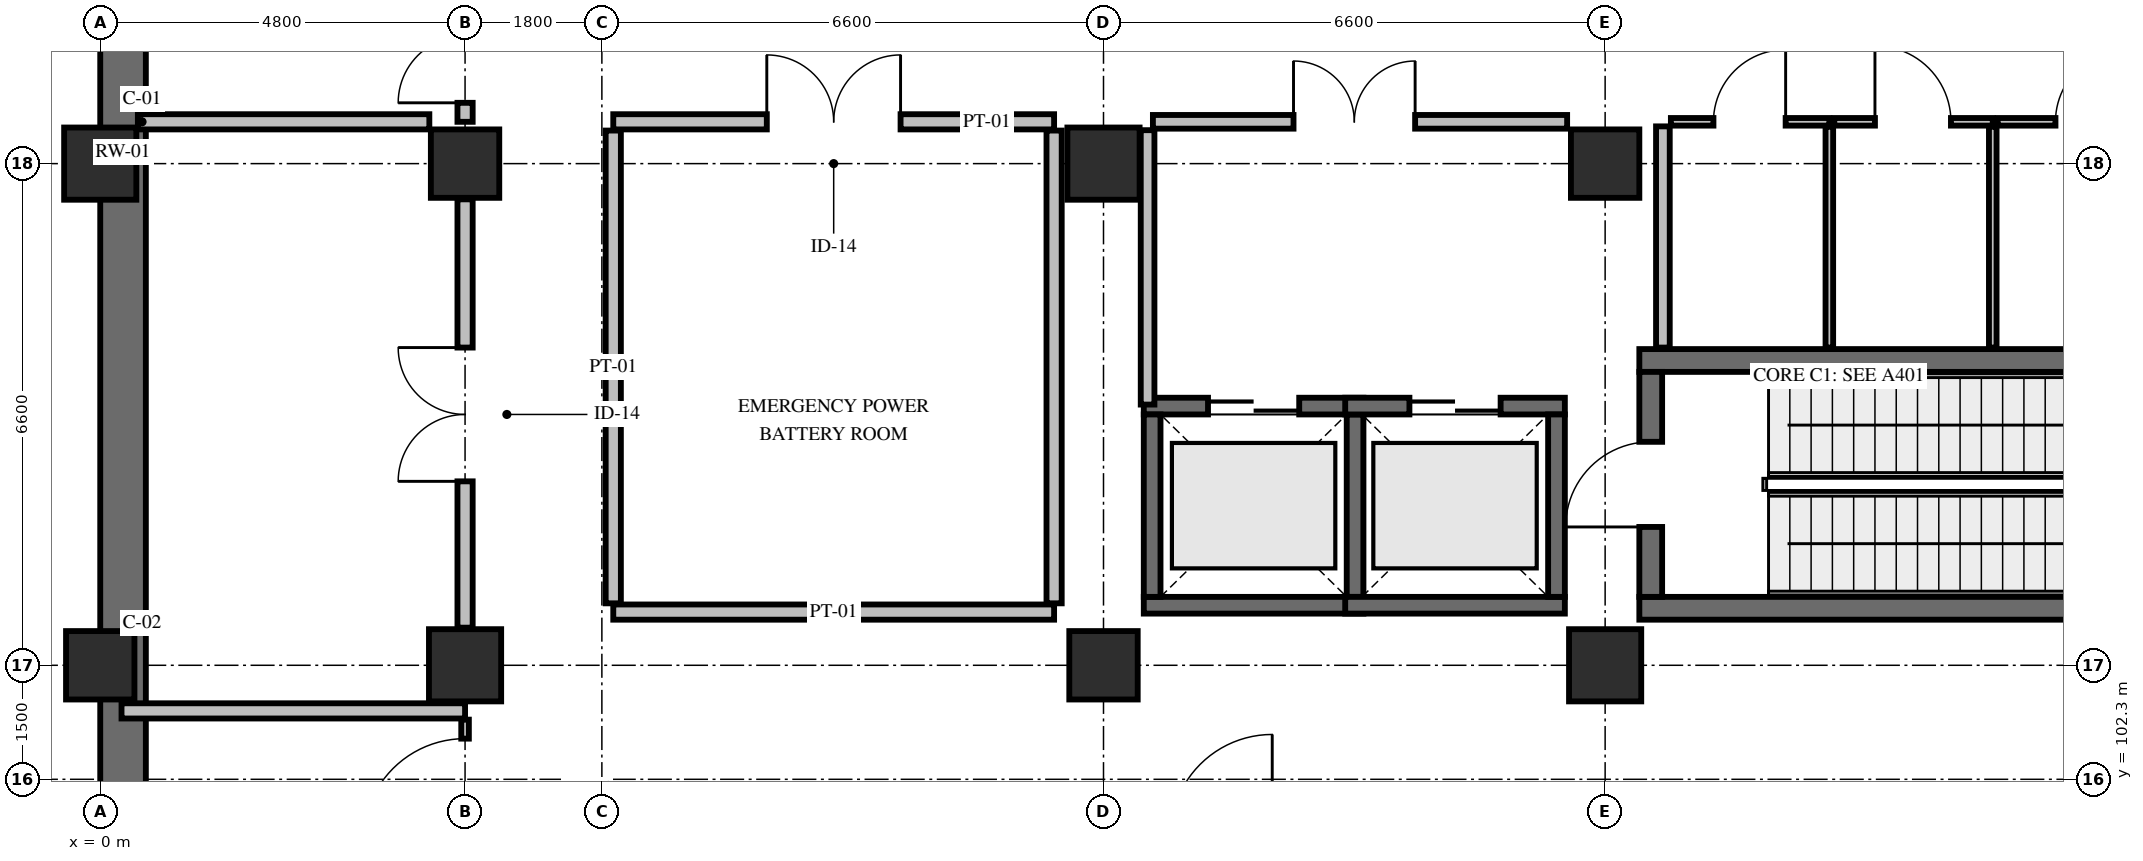
"""IFC4 building model, lengths in metres.
Left out: names, types, materials, properties, quantities, classifications, styles, units other than length and angle.
Written with IfcOpenShell. Run it as: python <this file> out.ifc"""

import sys

from ifc_helpers import new_model, si_unit, direction, frame, frame_2d, origin, origin_2d, place, context, subcontext, project, spatial, rectangle, extrude, element, fill, save


model = new_model("IFC4")
c1 = context("Model", 3, precision=1e-05, world=origin(), true_north=direction((0.0, 1.0)))
c2 = subcontext(c1, "Body", "Model", "MODEL_VIEW")
j1 = project(units=[si_unit("LENGTHUNIT", "METRE"), si_unit("PLANEANGLEUNIT", "RADIAN")], contexts=[c1])
p1 = place(None, origin())
s1 = spatial("IfcSite", under=j1, at=p1, CompositionType="ELEMENT")
p2 = place(p1, origin())
s2 = spatial("IfcBuilding", under=s1, at=p2, CompositionType="ELEMENT")
p3 = place(p2, frame((0.0, 0.0, -5.4)))
s3 = spatial("IfcBuildingStorey", under=s2, at=p3, CompositionType="ELEMENT", Elevation=-5.4)
p4 = place(p3, frame((0.3, 99.6, 0.0), z_axis=(0.0, 0.0, 1.0), x_axis=(0.0, 1.0, 0.0)))
e1 = element("IfcWall", 1, at=p4, inside=s3, PredefinedType="USERDEFINED", context=c2, shape_type="SweptSolid", body=[
    extrude(rectangle(XDim=21.9, YDim=0.6, at=frame_2d((10.95, 0.0))), origin(), (0.0, 0.0, 1.0), 4.96),
])
p5 = place(p3, frame((0.0, 103.8, 0.0), z_axis=(0.0, 0.0, 1.0), x_axis=(1.0, 0.0, 0.0)))
e2 = element("IfcColumn", 2, at=p5, inside=s3, PredefinedType="COLUMN", context=c2, shape_type="SweptSolid", body=[
    extrude(rectangle(XDim=0.9, YDim=0.9, at=origin_2d()), origin(), (0.0, 0.0, 1.0), 5.4),
])
for number, where, z_axis, x_axis in (
    (3, (0.0, 110.4, 0.0), (0.0, 0.0, 1.0), (1.0, 0.0, 0.0)),
    (4, (4.8, 103.8, 0.0), (0.0, 0.0, 1.0), (1.0, 0.0, 0.0)),
):
    element("IfcColumn", number, at=place(p3, frame(where, z_axis=z_axis, x_axis=x_axis)), inside=s3, PredefinedType="COLUMN", context=c2, shape_type="SweptSolid", body=[
        extrude(rectangle(XDim=0.95, YDim=0.95, at=origin_2d()), origin(), (0.0, 0.0, 1.0), 5.4),
    ])
for number, where, z_axis, x_axis in (
    (5, (4.8, 110.4, 0.0), (0.0, 0.0, 1.0), (1.0, 0.0, 0.0)),
    (6, (13.2, 103.8, 0.0), (0.0, 0.0, 1.0), (1.0, 0.0, 0.0)),
):
    element("IfcColumn", number, at=place(p3, frame(where, z_axis=z_axis, x_axis=x_axis)), inside=s3, PredefinedType="COLUMN", context=c2, shape_type="SweptSolid", body=[
        extrude(rectangle(XDim=0.9, YDim=0.9, at=origin_2d()), origin(), (0.0, 0.0, 1.0), 5.4),
    ])
for number, where, z_axis, x_axis in (
    (7, (13.2, 110.4, 0.0), (0.0, 0.0, 1.0), (1.0, 0.0, 0.0)),
    (8, (19.8, 103.8, 0.0), (0.0, 0.0, 1.0), (1.0, 0.0, 0.0)),
):
    element("IfcColumn", number, at=place(p3, frame(where, z_axis=z_axis, x_axis=x_axis)), inside=s3, PredefinedType="COLUMN", context=c2, shape_type="SweptSolid", body=[
        extrude(rectangle(XDim=0.95, YDim=0.95, at=origin_2d()), origin(), (0.0, 0.0, 1.0), 5.4),
    ])
p6 = place(p3, frame((19.8, 110.4, 0.0), z_axis=(0.0, 0.0, 1.0), x_axis=(1.0, 0.0, 0.0)))
e9 = element("IfcColumn", 9, at=p6, inside=s3, PredefinedType="COLUMN", context=c2, shape_type="SweptSolid", body=[
    extrude(rectangle(XDim=0.9, YDim=0.9, at=origin_2d()), origin(), (0.0, 0.0, 1.0), 5.4),
])
for number, where, z_axis, x_axis in (
    (10, (20.25, 104.55, 0.0), (0.0, 0.0, 1.0), (1.0, 0.0, 0.0)),
    (11, (20.25, 107.81, 0.0), (0.0, 0.0, 1.0), (1.0, 0.0, 0.0)),
):
    element("IfcWall", number, at=place(p3, frame(where, z_axis=z_axis, x_axis=x_axis)), inside=s3, PredefinedType="SHEAR", context=c2, shape_type="SweptSolid", body=[
        extrude(rectangle(XDim=7.6, YDim=0.3, at=frame_2d((3.8, 0.0))), origin(), (0.0, 0.0, 1.0), 4.98),
    ])
p7 = place(p3, frame((20.4, 104.7, 0.0), z_axis=(0.0, 0.0, 1.0), x_axis=(0.0, 1.0, 0.0)))
e12 = element("IfcWall", 12, at=p7, inside=s3, PredefinedType="SHEAR", context=c2, shape_type="SweptSolid", body=[
    extrude(rectangle(XDim=2.96, YDim=0.3, at=frame_2d((1.48, 0.0))), origin(), (0.0, 0.0, 1.0), 4.98),
])
p8 = place(p7, frame((0.92, 0.0, 0.0)))
e13 = element("IfcOpeningElement", 13, at=p8, cuts=e12, PredefinedType="OPENING", context=c2, shape_type="SweptSolid", body=[
    extrude(rectangle(XDim=1.12, YDim=2.2, at=frame_2d((0.56, 1.1))), frame((0.0, 0.165, 0.0), z_axis=(0.0, -1.0, 0.0), x_axis=(1.0, 0.0, 0.0)), (0.0, 0.0, 1.0), 0.33),
])
p9 = place(p3, frame((13.73, 104.59, 0.0), z_axis=(0.0, 0.0, 1.0), x_axis=(1.0, 0.0, 0.0)))
e14 = element("IfcWall", 14, at=p9, inside=s3, PredefinedType="SHEAR", context=c2, shape_type="SweptSolid", body=[
    extrude(rectangle(XDim=2.89, YDim=0.22, at=frame_2d((1.445, 0.0))), origin(), (0.0, 0.0, 1.0), 4.98),
])
p10 = place(p3, frame((13.73, 107.21, 0.0), z_axis=(0.0, 0.0, 1.0), x_axis=(1.0, 0.0, 0.0)))
e15 = element("IfcWall", 15, at=p10, inside=s3, PredefinedType="SHEAR", context=c2, shape_type="SweptSolid", body=[
    extrude(rectangle(XDim=2.89, YDim=0.22, at=frame_2d((1.445, 0.0))), origin(), (0.0, 0.0, 1.0), 4.98),
])
p11 = place(p10, frame((0.845, 0.0, 0.0)))
e16 = element("IfcOpeningElement", 16, at=p11, cuts=e15, PredefinedType="OPENING", context=c2, shape_type="SweptSolid", body=[
    extrude(rectangle(XDim=1.2, YDim=2.2, at=frame_2d((0.6, 1.1))), frame((0.0, 0.125, 0.0), z_axis=(0.0, -1.0, 0.0), x_axis=(1.0, 0.0, 0.0)), (0.0, 0.0, 1.0), 0.25),
])
for number, where, z_axis, x_axis in (
    (17, (13.84, 104.7, 0.0), (0.0, 0.0, 1.0), (0.0, 1.0, 0.0)),
    (18, (16.51, 104.7, 0.0), (0.0, 0.0, 1.0), (0.0, 1.0, 0.0)),
):
    element("IfcWall", number, at=place(p3, frame(where, z_axis=z_axis, x_axis=x_axis)), inside=s3, PredefinedType="SHEAR", context=c2, shape_type="SweptSolid", body=[
        extrude(rectangle(XDim=2.4, YDim=0.22, at=frame_2d((1.2, 0.0))), origin(), (0.0, 0.0, 1.0), 4.98),
    ])
p12 = place(p3, frame((16.38, 104.59, 0.0), z_axis=(0.0, 0.0, 1.0), x_axis=(1.0, 0.0, 0.0)))
e19 = element("IfcWall", 19, at=p12, inside=s3, PredefinedType="SHEAR", context=c2, shape_type="SweptSolid", body=[
    extrude(rectangle(XDim=2.89, YDim=0.22, at=frame_2d((1.445, 0.0))), origin(), (0.0, 0.0, 1.0), 4.98),
])
p13 = place(p3, frame((16.38, 107.21, 0.0), z_axis=(0.0, 0.0, 1.0), x_axis=(1.0, 0.0, 0.0)))
e20 = element("IfcWall", 20, at=p13, inside=s3, PredefinedType="SHEAR", context=c2, shape_type="SweptSolid", body=[
    extrude(rectangle(XDim=2.89, YDim=0.22, at=frame_2d((1.445, 0.0))), origin(), (0.0, 0.0, 1.0), 4.98),
])
p14 = place(p13, frame((0.845, 0.0, 0.0)))
e21 = element("IfcOpeningElement", 21, at=p14, cuts=e20, PredefinedType="OPENING", context=c2, shape_type="SweptSolid", body=[
    extrude(rectangle(XDim=1.2, YDim=2.2, at=frame_2d((0.6, 1.1))), frame((0.0, 0.125, 0.0), z_axis=(0.0, -1.0, 0.0), x_axis=(1.0, 0.0, 0.0)), (0.0, 0.0, 1.0), 0.25),
])
p15 = place(p3, frame((19.16, 104.7, 0.0), z_axis=(0.0, 0.0, 1.0), x_axis=(0.0, 1.0, 0.0)))
e22 = element("IfcWall", 22, at=p15, inside=s3, PredefinedType="SHEAR", context=c2, shape_type="SweptSolid", body=[
    extrude(rectangle(XDim=2.4, YDim=0.22, at=frame_2d((1.2, 0.0))), origin(), (0.0, 0.0, 1.0), 4.98),
])
p16 = place(p3, frame((13.85, 110.95, 0.0), z_axis=(0.0, 0.0, 1.0), x_axis=(1.0, 0.0, 0.0)))
e23 = element("IfcWall", 23, at=p16, inside=s3, PredefinedType="PARTITIONING", context=c2, shape_type="SweptSolid", body=[
    extrude(rectangle(XDim=5.45, YDim=0.18, at=frame_2d((2.725, 0.0))), origin(), (0.0, 0.0, 1.0), 4.895),
])
p17 = place(p16, frame((1.85, 0.0, 0.0)))
e24 = element("IfcOpeningElement", 24, at=p17, cuts=e23, PredefinedType="OPENING", context=c2, shape_type="SweptSolid", body=[
    extrude(rectangle(XDim=1.6, YDim=2.25, at=frame_2d((0.8, 1.125))), frame((0.0, 0.105, 0.0), z_axis=(0.0, -1.0, 0.0), x_axis=(1.0, 0.0, 0.0)), (0.0, 0.0, 1.0), 0.21),
])
p18 = place(p3, frame((13.78, 107.23, 0.0), z_axis=(0.0, 0.0, 1.0), x_axis=(0.0, 1.0, 0.0)))
e25 = element("IfcWall", 25, at=p18, inside=s3, PredefinedType="PARTITIONING", context=c2, shape_type="SweptSolid", body=[
    extrude(rectangle(XDim=3.61, YDim=0.18, at=frame_2d((1.805, 0.0))), origin(), (0.0, 0.0, 1.0), 4.73),
])
p19 = place(p3, frame((20.56, 107.98, 0.0), z_axis=(0.0, 0.0, 1.0), x_axis=(0.0, 1.0, 0.0)))
e26 = element("IfcWall", 26, at=p19, inside=s3, PredefinedType="PARTITIONING", context=c2, shape_type="SweptSolid", body=[
    extrude(rectangle(XDim=2.91, YDim=0.18, at=frame_2d((1.455, 0.0))), origin(), (0.0, 0.0, 1.0), 4.43),
])
p20 = place(p3, frame((20.665, 110.95, 0.0), z_axis=(0.0, 0.0, 1.0), x_axis=(1.0, 0.0, 0.0)))
e27 = element("IfcWall", 27, at=p20, inside=s3, PredefinedType="PARTITIONING", context=c2, shape_type="SweptSolid", body=[
    extrude(rectangle(XDim=2.085, YDim=0.1, at=frame_2d((1.042, 0.0))), origin(), (0.0, 0.0, 1.0), 4.895),
])
p21 = place(p20, frame((0.56, 0.0, 0.0)))
e28 = element("IfcOpeningElement", 28, at=p21, cuts=e27, PredefinedType="OPENING", context=c2, shape_type="SweptSolid", body=[
    extrude(rectangle(XDim=0.95, YDim=2.15, at=frame_2d((0.475, 1.075))), frame((0.0, 0.065, 0.0), z_axis=(0.0, -1.0, 0.0), x_axis=(1.0, 0.0, 0.0)), (0.0, 0.0, 1.0), 0.13),
])
p22 = place(p3, frame((22.75, 107.98, 0.0), z_axis=(0.0, 0.0, 1.0), x_axis=(0.0, 1.0, 0.0)))
e29 = element("IfcWall", 29, at=p22, inside=s3, PredefinedType="PARTITIONING", context=c2, shape_type="SweptSolid", body=[
    extrude(rectangle(XDim=2.905, YDim=0.1, at=frame_2d((1.453, 0.0))), origin(), (0.0, 0.0, 1.0), 4.43),
])
p23 = place(p3, frame((22.815, 110.95, 0.0), z_axis=(0.0, 0.0, 1.0), x_axis=(1.0, 0.0, 0.0)))
e30 = element("IfcWall", 30, at=p23, inside=s3, PredefinedType="PARTITIONING", context=c2, shape_type="SweptSolid", body=[
    extrude(rectangle(XDim=2.085, YDim=0.1, at=frame_2d((1.042, 0.0))), origin(), (0.0, 0.0, 1.0), 4.96),
])
p24 = place(p23, frame((0.535, 0.0, 0.0)))
e31 = element("IfcOpeningElement", 31, at=p24, cuts=e30, PredefinedType="OPENING", context=c2, shape_type="SweptSolid", body=[
    extrude(rectangle(XDim=1.0, YDim=2.15, at=frame_2d((0.5, 1.075))), frame((0.0, 0.065, 0.0), z_axis=(0.0, -1.0, 0.0), x_axis=(1.0, 0.0, 0.0)), (0.0, 0.0, 1.0), 0.13),
])
p25 = place(p3, frame((24.9, 107.98, 0.0), z_axis=(0.0, 0.0, 1.0), x_axis=(0.0, 1.0, 0.0)))
e32 = element("IfcWall", 32, at=p25, inside=s3, PredefinedType="PARTITIONING", context=c2, shape_type="SweptSolid", body=[
    extrude(rectangle(XDim=2.905, YDim=0.1, at=frame_2d((1.453, 0.0))), origin(), (0.0, 0.0, 1.0), 4.43),
])
p26 = place(p3, frame((24.965, 110.95, 0.0), z_axis=(0.0, 0.0, 1.0), x_axis=(1.0, 0.0, 0.0)))
e33 = element("IfcWall", 33, at=p26, inside=s3, PredefinedType="PARTITIONING", context=c2, shape_type="SweptSolid", body=[
    extrude(rectangle(XDim=2.485, YDim=0.1, at=frame_2d((1.242, 0.0))), origin(), (0.0, 0.0, 1.0), 4.895),
])
p27 = place(p26, frame((0.76, 0.0, 0.0)))
e34 = element("IfcOpeningElement", 34, at=p27, cuts=e33, PredefinedType="OPENING", context=c2, shape_type="SweptSolid", body=[
    extrude(rectangle(XDim=0.95, YDim=2.15, at=frame_2d((0.475, 1.075))), frame((0.0, 0.065, 0.0), z_axis=(0.0, -1.0, 0.0), x_axis=(1.0, 0.0, 0.0)), (0.0, 0.0, 1.0), 0.13),
])
p28 = place(p3, frame((6.75, 104.5, 0.0), z_axis=(0.0, 0.0, 1.0), x_axis=(1.0, 0.0, 0.0)))
e35 = element("IfcWall", 35, at=p28, inside=s3, PredefinedType="PARTITIONING", context=c2, shape_type="SweptSolid", body=[
    extrude(rectangle(XDim=5.8, YDim=0.2, at=frame_2d((2.9, 0.0))), origin(), (0.0, 0.0, 1.0), 4.895),
])
p29 = place(p3, frame((6.75, 110.95, 0.0), z_axis=(0.0, 0.0, 1.0), x_axis=(1.0, 0.0, 0.0)))
e36 = element("IfcWall", 36, at=p29, inside=s3, PredefinedType="PARTITIONING", context=c2, shape_type="SweptSolid", body=[
    extrude(rectangle(XDim=5.8, YDim=0.2, at=frame_2d((2.9, 0.0))), origin(), (0.0, 0.0, 1.0), 4.895),
])
p30 = place(p29, frame((2.02, 0.0, 0.0)))
e37 = element("IfcOpeningElement", 37, at=p30, cuts=e36, PredefinedType="OPENING", context=c2, shape_type="SweptSolid", body=[
    extrude(rectangle(XDim=1.76, YDim=2.35, at=frame_2d((0.88, 1.175))), frame((0.0, 0.115, 0.0), z_axis=(0.0, -1.0, 0.0), x_axis=(1.0, 0.0, 0.0)), (0.0, 0.0, 1.0), 0.23),
])
for number, where, z_axis, x_axis in (
    (38, (6.75, 104.615, 0.0), (0.0, 0.0, 1.0), (0.0, 1.0, 0.0)),
    (39, (12.55, 104.615, 0.0), (0.0, 0.0, 1.0), (0.0, 1.0, 0.0)),
):
    element("IfcWall", number, at=place(p3, frame(where, z_axis=z_axis, x_axis=x_axis)), inside=s3, PredefinedType="PARTITIONING", context=c2, shape_type="SweptSolid", body=[
        extrude(rectangle(XDim=6.22, YDim=0.2, at=frame_2d((3.11, 0.0))), origin(), (0.0, 0.0, 1.0), 4.43),
    ])
p31 = place(p3, frame((0.28, 103.2, 0.0), z_axis=(0.0, 0.0, 1.0), x_axis=(1.0, 0.0, 0.0)))
e40 = element("IfcWall", 40, at=p31, inside=s3, PredefinedType="PARTITIONING", context=c2, shape_type="SweptSolid", body=[
    extrude(rectangle(XDim=4.52, YDim=0.2, at=frame_2d((2.26, 0.0))), origin(), (0.0, 0.0, 1.0), 4.73),
])
p32 = place(p3, frame((0.495, 110.95, 0.0), z_axis=(0.0, 0.0, 1.0), x_axis=(1.0, 0.0, 0.0)))
e41 = element("IfcWall", 41, at=p32, inside=s3, PredefinedType="PARTITIONING", context=c2, shape_type="SweptSolid", body=[
    extrude(rectangle(XDim=3.835, YDim=0.2, at=frame_2d((1.917, 0.0))), origin(), (0.0, 0.0, 1.0), 4.895),
])
p33 = place(p3, frame((4.8, 104.295, 0.0), z_axis=(0.0, 0.0, 1.0), x_axis=(0.0, 1.0, 0.0)))
e42 = element("IfcWall", 42, at=p33, inside=s3, PredefinedType="PARTITIONING", context=c2, shape_type="SweptSolid", body=[
    extrude(rectangle(XDim=5.635, YDim=0.2, at=frame_2d((2.817, 0.0))), origin(), (0.0, 0.0, 1.0), 4.73),
])
p34 = place(p33, frame((1.925, 0.0, 0.0)))
e43 = element("IfcOpeningElement", 43, at=p34, cuts=e42, PredefinedType="OPENING", context=c2, shape_type="SweptSolid", body=[
    extrude(rectangle(XDim=1.76, YDim=2.35, at=frame_2d((0.88, 1.175))), frame((0.0, 0.115, 0.0), z_axis=(0.0, -1.0, 0.0), x_axis=(1.0, 0.0, 0.0)), (0.0, 0.0, 1.0), 0.23),
])
p35 = place(p3, frame((4.8, 110.95, 0.0), z_axis=(0.0, 0.0, 1.0), x_axis=(0.0, 1.0, 0.0)))
e44 = element("IfcWall", 44, at=p35, inside=s3, PredefinedType="PARTITIONING", context=c2, shape_type="SweptSolid", body=[
    extrude(rectangle(XDim=5.855, YDim=0.2, at=frame_2d((2.927, 0.0))), origin(), (0.0, 0.0, 1.0), 4.73),
])
p36 = place(p35, frame((0.25, 0.0, 0.0)))
e45 = element("IfcOpeningElement", 45, at=p36, cuts=e44, PredefinedType="OPENING", context=c2, shape_type="SweptSolid", body=[
    extrude(rectangle(XDim=1.76, YDim=2.35, at=frame_2d((0.88, 1.175))), frame((0.0, 0.115, 0.0), z_axis=(0.0, -1.0, 0.0), x_axis=(1.0, 0.0, 0.0)), (0.0, 0.0, 1.0), 0.23),
])
p37 = place(p3, frame((4.8, 99.47, 0.0), z_axis=(0.0, 0.0, 1.0), x_axis=(0.0, 1.0, 0.0)))
e46 = element("IfcWall", 46, at=p37, inside=s3, PredefinedType="PARTITIONING", context=c2, shape_type="SweptSolid", body=[
    extrude(rectangle(XDim=3.615, YDim=0.1, at=frame_2d((1.808, 0.0))), origin(), (0.0, 0.0, 1.0), 4.73),
])
p38 = place(p37, frame((2.025, 0.0, 0.0)))
e47 = element("IfcOpeningElement", 47, at=p38, cuts=e46, PredefinedType="OPENING", context=c2, shape_type="SweptSolid", body=[
    extrude(rectangle(XDim=1.34, YDim=2.2, at=frame_2d((0.67, 1.1))), frame((0.0, 0.065, 0.0), z_axis=(0.0, -1.0, 0.0), x_axis=(1.0, 0.0, 0.0)), (0.0, 0.0, 1.0), 0.13),
])
p39 = place(p8, origin())
e48 = element("IfcDoor", 48, at=p39, inside=s3, OperationType="SINGLE_SWING_LEFT", PredefinedType="DOOR", context=c2, shape_type="SweptSolid", body=[
    extrude(rectangle(XDim=1.12, YDim=2.2, at=frame_2d((0.56, 1.1))), frame((0.0, 0.025, 0.0), z_axis=(0.0, -1.0, 0.0), x_axis=(1.0, 0.0, 0.0)), (0.0, 0.0, 1.0), 0.05),
])
fill(e13, e48)
p40 = place(p11, origin())
e49 = element("IfcDoor", 49, at=p40, inside=s3, OperationType="DOUBLE_DOOR_SLIDING", PredefinedType="DOOR", context=c2, shape_type="SweptSolid", body=[
    extrude(rectangle(XDim=1.2, YDim=2.2, at=frame_2d((0.6, 1.1))), frame((0.0, 0.025, 0.0), z_axis=(0.0, -1.0, 0.0), x_axis=(1.0, 0.0, 0.0)), (0.0, 0.0, 1.0), 0.05),
])
fill(e16, e49)
p41 = place(p14, origin())
e50 = element("IfcDoor", 50, at=p41, inside=s3, OperationType="DOUBLE_DOOR_SLIDING", PredefinedType="DOOR", context=c2, shape_type="SweptSolid", body=[
    extrude(rectangle(XDim=1.2, YDim=2.2, at=frame_2d((0.6, 1.1))), frame((0.0, 0.025, 0.0), z_axis=(0.0, -1.0, 0.0), x_axis=(1.0, 0.0, 0.0)), (0.0, 0.0, 1.0), 0.05),
])
fill(e21, e50)
p42 = place(p17, origin())
e51 = element("IfcDoor", 51, at=p42, inside=s3, OperationType="DOUBLE_DOOR_SINGLE_SWING", PredefinedType="DOOR", context=c2, shape_type="SweptSolid", body=[
    extrude(rectangle(XDim=1.6, YDim=2.25, at=frame_2d((0.8, 1.125))), frame((0.0, 0.025, 0.0), z_axis=(0.0, -1.0, 0.0), x_axis=(1.0, 0.0, 0.0)), (0.0, 0.0, 1.0), 0.05),
])
fill(e24, e51)
p43 = place(p21, origin())
e52 = element("IfcDoor", 52, at=p43, inside=s3, OperationType="SINGLE_SWING_RIGHT", PredefinedType="DOOR", context=c2, shape_type="SweptSolid", body=[
    extrude(rectangle(XDim=0.95, YDim=2.15, at=frame_2d((0.475, 1.075))), frame((0.0, 0.025, 0.0), z_axis=(0.0, -1.0, 0.0), x_axis=(1.0, 0.0, 0.0)), (0.0, 0.0, 1.0), 0.05),
])
fill(e28, e52)
p44 = place(p24, origin())
e53 = element("IfcDoor", 53, at=p44, inside=s3, OperationType="SINGLE_SWING_LEFT", PredefinedType="DOOR", context=c2, shape_type="SweptSolid", body=[
    extrude(rectangle(XDim=1.0, YDim=2.15, at=frame_2d((0.5, 1.075))), frame((0.0, 0.025, 0.0), z_axis=(0.0, -1.0, 0.0), x_axis=(1.0, 0.0, 0.0)), (0.0, 0.0, 1.0), 0.05),
])
fill(e31, e53)
p45 = place(p27, origin())
e54 = element("IfcDoor", 54, at=p45, inside=s3, OperationType="SINGLE_SWING_RIGHT", PredefinedType="DOOR", context=c2, shape_type="SweptSolid", body=[
    extrude(rectangle(XDim=0.95, YDim=2.15, at=frame_2d((0.475, 1.075))), frame((0.0, 0.025, 0.0), z_axis=(0.0, -1.0, 0.0), x_axis=(1.0, 0.0, 0.0)), (0.0, 0.0, 1.0), 0.05),
])
fill(e34, e54)
p46 = place(p30, origin())
e55 = element("IfcDoor", 55, at=p46, inside=s3, OperationType="DOUBLE_DOOR_SINGLE_SWING", PredefinedType="DOOR", context=c2, shape_type="SweptSolid", body=[
    extrude(rectangle(XDim=1.76, YDim=2.35, at=frame_2d((0.88, 1.175))), frame((0.0, 0.025, 0.0), z_axis=(0.0, -1.0, 0.0), x_axis=(1.0, 0.0, 0.0)), (0.0, 0.0, 1.0), 0.05),
])
fill(e37, e55)
p47 = place(p34, origin())
e56 = element("IfcDoor", 56, at=p47, inside=s3, OperationType="DOUBLE_DOOR_SINGLE_SWING", PredefinedType="DOOR", context=c2, shape_type="SweptSolid", body=[
    extrude(rectangle(XDim=1.76, YDim=2.35, at=frame_2d((0.88, 1.175))), frame((0.0, 0.025, 0.0), z_axis=(0.0, -1.0, 0.0), x_axis=(1.0, 0.0, 0.0)), (0.0, 0.0, 1.0), 0.05),
])
fill(e43, e56)
p48 = place(p36, origin())
e57 = element("IfcDoor", 57, at=p48, inside=s3, OperationType="DOUBLE_DOOR_SINGLE_SWING", PredefinedType="DOOR", context=c2, shape_type="SweptSolid", body=[
    extrude(rectangle(XDim=1.76, YDim=2.35, at=frame_2d((0.88, 1.175))), frame((0.0, 0.025, 0.0), z_axis=(0.0, -1.0, 0.0), x_axis=(1.0, 0.0, 0.0)), (0.0, 0.0, 1.0), 0.05),
])
fill(e45, e57)
p49 = place(p38, origin())
e58 = element("IfcDoor", 58, at=p49, inside=s3, OperationType="SINGLE_SWING_LEFT", PredefinedType="DOOR", context=c2, shape_type="SweptSolid", body=[
    extrude(rectangle(XDim=1.34, YDim=2.2, at=frame_2d((0.67, 1.1))), frame((0.0, 0.025, 0.0), z_axis=(0.0, -1.0, 0.0), x_axis=(1.0, 0.0, 0.0)), (0.0, 0.0, 1.0), 0.05),
])
fill(e47, e58)
save(model, sys.argv[1])
